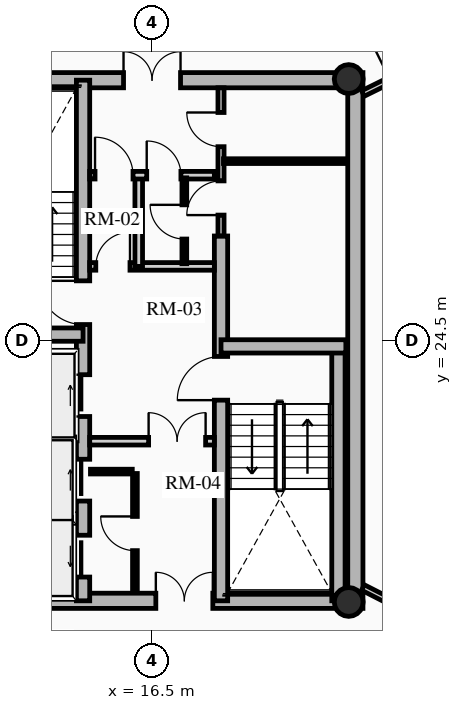
"""IFC4 building model, lengths in metres.
Left out: names, types, materials, properties, quantities, classifications, styles, units other than length and angle.
Written with IfcOpenShell. Run it as: python <this file> out.ifc"""

import sys

from ifc_helpers import new_model, si_unit, direction, frame, frame_2d, origin, origin_2d, place, context, subcontext, project, spatial, rectangle, hollow_circle, extrude, source, transform, mapped, element, fill, save


model = new_model("IFC4")
c1 = context("Model", 3, precision=1e-05, world=origin(), true_north=direction((0.0, 1.0)))
c2 = subcontext(c1, "Body", "Model", "MODEL_VIEW")
j1 = project(units=[si_unit("LENGTHUNIT", "METRE"), si_unit("PLANEANGLEUNIT", "RADIAN")], contexts=[c1])
p1 = place(None, origin())
s1 = spatial("IfcSite", under=j1, at=p1, CompositionType="ELEMENT")
p2 = place(p1, origin())
s2 = spatial("IfcBuilding", under=s1, at=p2, CompositionType="ELEMENT")
p3 = place(p2, frame((0.0, 0.0, 163.24)))
s3 = spatial("IfcBuildingStorey", under=s2, at=p3, CompositionType="ELEMENT", Elevation=163.24)
p4 = place(p3, frame((21.85, 17.45, 0.0), z_axis=(0.0, 0.0, 1.0), x_axis=(0.0, 1.0, 0.0)))
e1 = element("IfcWall", 1, at=p4, inside=s3, PredefinedType="SHEAR", context=c2, shape_type="SweptSolid", body=[
    extrude(rectangle(XDim=14.1, YDim=0.4, at=frame_2d((7.05, 0.0))), origin(), (0.0, 0.0, 1.0), 2.91),
])
p5 = place(p3, frame((11.15, 17.65, 0.0), z_axis=(0.0, 0.0, 1.0), x_axis=(1.0, 0.0, 0.0)))
e2 = element("IfcWall", 2, at=p5, inside=s3, PredefinedType="SHEAR", context=c2, shape_type="SweptSolid", body=[
    extrude(rectangle(XDim=10.7, YDim=0.4, at=frame_2d((5.35, 0.0))), origin(), (0.0, 0.0, 1.0), 2.91),
])
m1 = source(origin(), c2, "Body", "SweptSolid", [
    extrude(rectangle(XDim=1.5, YDim=2.02, at=frame_2d((0.75, 1.01))), frame((0.0, 0.21, 0.0), z_axis=(0.0, -1.0, 0.0), x_axis=(1.0, 0.0, 0.0)), (0.0, 0.0, 1.0), 0.42),
])
p6 = place(p5, frame((5.45, 0.0, 0.0)))
e3 = element("IfcOpeningElement", 3, at=p6, cuts=e2, PredefinedType="OPENING", context=c2, shape_type="MappedRepresentation", body=[
    mapped(m1, transform((0.0, 0.0, 0.0), x_axis=(1.0, 0.0, 0.0), y_axis=(0.0, 1.0, 0.0), z_axis=(0.0, 0.0, 1.0), scale=1.0)),
])
p7 = place(p3, frame((11.15, 31.35, 0.0), z_axis=(0.0, 0.0, 1.0), x_axis=(1.0, 0.0, 0.0)))
e4 = element("IfcWall", 4, at=p7, inside=s3, PredefinedType="SHEAR", context=c2, shape_type="SweptSolid", body=[
    extrude(rectangle(XDim=10.7, YDim=0.4, at=frame_2d((5.35, 0.0))), origin(), (0.0, 0.0, 1.0), 2.91),
])
p8 = place(p7, frame((4.6, 0.0, 0.0)))
e5 = element("IfcOpeningElement", 5, at=p8, cuts=e4, PredefinedType="OPENING", context=c2, shape_type="MappedRepresentation", body=[
    mapped(m1, transform((0.0, 0.0, 0.0), x_axis=(1.0, 0.0, 0.0), y_axis=(0.0, 1.0, 0.0), z_axis=(0.0, 0.0, 1.0), scale=1.0)),
])
p9 = place(p3, frame((14.685, 17.65, 0.0), z_axis=(0.0, 0.0, 1.0), x_axis=(0.0, 1.0, 0.0)))
e6 = element("IfcWall", 6, at=p9, inside=s3, PredefinedType="SHEAR", context=c2, shape_type="SweptSolid", body=[
    extrude(rectangle(XDim=13.7, YDim=0.35, at=frame_2d((6.85, 0.0))), origin(), (0.0, 0.0, 1.0), 2.91),
])
m2 = source(origin(), c2, "Body", "SweptSolid", [
    extrude(rectangle(XDim=1.1, YDim=2.015, at=frame_2d((0.55, 1.007))), frame((0.0, 0.185, 0.0), z_axis=(0.0, -1.0, 0.0), x_axis=(1.0, 0.0, 0.0)), (0.0, 0.0, 1.0), 0.37),
])
p10 = place(p9, frame((4.85, 0.0, 0.0)))
e7 = element("IfcOpeningElement", 7, at=p10, cuts=e6, PredefinedType="OPENING", context=c2, shape_type="MappedRepresentation", body=[
    mapped(m2, transform((0.0, 0.0, 0.0), x_axis=(1.0, 0.0, 0.0), y_axis=(0.0, 1.0, 0.0), z_axis=(0.0, 0.0, 1.0), scale=1.0)),
])
p11 = place(p9, frame((0.625, 0.0, 0.0)))
e8 = element("IfcOpeningElement", 8, at=p11, cuts=e6, PredefinedType="OPENING", context=c2, shape_type="MappedRepresentation", body=[
    mapped(m2, transform((0.0, 0.0, 0.0), x_axis=(1.0, 0.0, 0.0), y_axis=(0.0, 1.0, 0.0), z_axis=(0.0, 0.0, 1.0), scale=1.0)),
])
p12 = place(p9, frame((2.625, 0.0, 0.0)))
e9 = element("IfcOpeningElement", 9, at=p12, cuts=e6, PredefinedType="OPENING", context=c2, shape_type="MappedRepresentation", body=[
    mapped(m2, transform((0.0, 0.0, 0.0), x_axis=(1.0, 0.0, 0.0), y_axis=(0.0, 1.0, 0.0), z_axis=(0.0, 0.0, 1.0), scale=1.0)),
])
m3 = source(origin(), c2, "Body", "SweptSolid", [
    extrude(rectangle(XDim=1.15, YDim=2.02, at=frame_2d((0.575, 1.01))), frame((0.0, 0.185, 0.0), z_axis=(0.0, -1.0, 0.0), x_axis=(1.0, 0.0, 0.0)), (0.0, 0.0, 1.0), 0.37),
])
p13 = place(p9, frame((7.27, 0.0, 0.0)))
e10 = element("IfcOpeningElement", 10, at=p13, cuts=e6, PredefinedType="OPENING", context=c2, shape_type="MappedRepresentation", body=[
    mapped(m3, transform((0.0, 0.0, 0.0), x_axis=(1.0, 0.0, 0.0), y_axis=(0.0, 1.0, 0.0), z_axis=(0.0, 0.0, 1.0), scale=1.0)),
])
p14 = place(p3, frame((18.315, 17.65, 0.0), z_axis=(0.0, 0.0, 1.0), x_axis=(0.0, 1.0, 0.0)))
e11 = element("IfcWall", 11, at=p14, inside=s3, PredefinedType="SHEAR", context=c2, shape_type="SweptSolid", body=[
    extrude(rectangle(XDim=9.6, YDim=0.35, at=frame_2d((4.8, 0.0))), origin(), (0.0, 0.0, 1.0), 2.91),
])
p15 = place(p14, frame((5.28, 0.0, 0.0)))
e12 = element("IfcOpeningElement", 12, at=p15, cuts=e11, PredefinedType="OPENING", context=c2, shape_type="MappedRepresentation", body=[
    mapped(m3, transform((0.0, 0.0, 0.0), x_axis=(1.0, 0.0, 0.0), y_axis=(0.0, 1.0, 0.0), z_axis=(0.0, 0.0, 1.0), scale=1.0)),
])
p16 = place(p3, frame((11.4, 24.655, 0.0), z_axis=(0.0, 0.0, 1.0), x_axis=(1.0, 0.0, 0.0)))
e13 = element("IfcWall", 13, at=p16, inside=s3, PredefinedType="SHEAR", context=c2, shape_type="SweptSolid", body=[
    extrude(rectangle(XDim=3.285, YDim=0.35, at=frame_2d((1.643, 0.0))), origin(), (0.0, 0.0, 1.0), 2.91),
])
p17 = place(p3, frame((21.405, 17.65, 0.0), z_axis=(0.0, 0.0, 1.0), x_axis=(0.0, 1.0, 0.0)))
e14 = element("IfcWall", 14, at=p17, inside=s3, PredefinedType="SHEAR", context=c2, shape_type="SweptSolid", body=[
    extrude(rectangle(XDim=6.695, YDim=0.35, at=frame_2d((3.348, 0.0))), origin(), (0.0, 0.0, 1.0), 2.91),
])
p18 = place(p3, frame((18.315, 24.345, 0.0), z_axis=(0.0, 0.0, 1.0), x_axis=(1.0, 0.0, 0.0)))
e15 = element("IfcWall", 15, at=p18, inside=s3, PredefinedType="SHEAR", context=c2, shape_type="SweptSolid", body=[
    extrude(rectangle(XDim=3.285, YDim=0.35, at=frame_2d((1.643, 0.0))), origin(), (0.0, 0.0, 1.0), 2.91),
])
for number, where, z_axis, x_axis in (
    (16, (21.675, 17.62, 0.0), (0.0, 0.0, 1.0), (1.0, 0.0, 0.0)),
    (17, (21.675, 31.38, 0.0), (0.0, 0.0, 1.0), (1.0, 0.0, 0.0)),
):
    element("IfcColumn", number, at=place(p3, frame(where, z_axis=z_axis, x_axis=x_axis)), inside=s3, PredefinedType="COLUMN", context=c2, shape_type="SweptSolid", body=[
        extrude(hollow_circle(Radius=0.38, WallThickness=0.032, at=origin_2d()), origin(), (0.0, 0.0, 1.0), 2.91),
    ])
for number, where, z_axis, x_axis in (
    (18, (11.52, 21.8, 0.0), (0.0, 0.0, 1.0), (1.0, 0.0, 0.0)),
    (19, (11.52, 19.825, 0.0), (0.0, 0.0, 1.0), (1.0, 0.0, 0.0)),
):
    element("IfcWall", number, at=place(p3, frame(where, z_axis=z_axis, x_axis=x_axis)), inside=s3, PredefinedType="SHEAR", context=c2, shape_type="SweptSolid", body=[
        extrude(rectangle(XDim=2.97, YDim=0.2, at=frame_2d((1.485, 0.0))), origin(), (0.0, 0.0, 1.0), 2.91),
    ])
p19 = place(p3, frame((14.86, 21.85, 0.0), z_axis=(0.0, 0.0, 1.0), x_axis=(1.0, 0.0, 0.0)))
e20 = element("IfcWall", 20, at=p19, inside=s3, PredefinedType="PARTITIONING", context=c2, shape_type="SweptSolid", body=[
    extrude(rectangle(XDim=3.28, YDim=0.2, at=frame_2d((1.64, 0.0))), origin(), (0.0, 0.0, 1.0), 2.675),
])
m4 = source(origin(), c2, "Body", "SweptSolid", [
    extrude(rectangle(XDim=1.5, YDim=2.02, at=frame_2d((0.75, 1.01))), frame((0.0, 0.11, 0.0), z_axis=(0.0, -1.0, 0.0), x_axis=(1.0, 0.0, 0.0)), (0.0, 0.0, 1.0), 0.22),
])
p20 = place(p19, frame((1.55, 0.0, 0.0)))
e21 = element("IfcOpeningElement", 21, at=p20, cuts=e20, PredefinedType="OPENING", context=c2, shape_type="MappedRepresentation", body=[
    mapped(m4, transform((0.0, 0.0, 0.0), x_axis=(1.0, 0.0, 0.0), y_axis=(0.0, 1.0, 0.0), z_axis=(0.0, 0.0, 1.0), scale=1.0)),
])
p21 = place(p3, frame((14.86, 26.45, 0.0), z_axis=(0.0, 0.0, 1.0), x_axis=(1.0, 0.0, 0.0)))
e22 = element("IfcWall", 22, at=p21, inside=s3, PredefinedType="PARTITIONING", context=c2, shape_type="SweptSolid", body=[
    extrude(rectangle(XDim=3.28, YDim=0.2, at=frame_2d((1.64, 0.0))), origin(), (0.0, 0.0, 1.0), 2.675),
])
m5 = source(origin(), c2, "Body", "SweptSolid", [
    extrude(rectangle(XDim=0.9, YDim=2.005, at=frame_2d((0.45, 1.002))), frame((0.0, 0.11, 0.0), z_axis=(0.0, -1.0, 0.0), x_axis=(1.0, 0.0, 0.0)), (0.0, 0.0, 1.0), 0.22),
])
p22 = place(p21, frame((0.16, 0.0, 0.0)))
e23 = element("IfcOpeningElement", 23, at=p22, cuts=e22, PredefinedType="OPENING", context=c2, shape_type="MappedRepresentation", body=[
    mapped(m5, transform((0.0, 0.0, 0.0), x_axis=(1.0, 0.0, 0.0), y_axis=(0.0, 1.0, 0.0), z_axis=(0.0, 0.0, 1.0), scale=1.0)),
])
p23 = place(p3, frame((16.15, 26.45, 0.0), z_axis=(0.0, 0.0, 1.0), x_axis=(0.0, 1.0, 0.0)))
e24 = element("IfcWall", 24, at=p23, inside=s3, PredefinedType="PARTITIONING", context=c2, shape_type="SweptSolid", body=[
    extrude(rectangle(XDim=2.4, YDim=0.2, at=frame_2d((1.2, 0.0))), origin(), (0.0, 0.0, 1.0), 2.675),
])
p24 = place(p3, frame((14.86, 28.85, 0.0), z_axis=(0.0, 0.0, 1.0), x_axis=(1.0, 0.0, 0.0)))
e25 = element("IfcWall", 25, at=p24, inside=s3, PredefinedType="PARTITIONING", context=c2, shape_type="SweptSolid", body=[
    extrude(rectangle(XDim=3.28, YDim=0.2, at=frame_2d((1.64, 0.0))), origin(), (0.0, 0.0, 1.0), 2.675),
])
m6 = source(origin(), c2, "Body", "SweptSolid", [
    extrude(rectangle(XDim=1.0, YDim=2.015, at=frame_2d((0.5, 1.007))), frame((0.0, 0.11, 0.0), z_axis=(0.0, -1.0, 0.0), x_axis=(1.0, 0.0, 0.0)), (0.0, 0.0, 1.0), 0.22),
])
p25 = place(p24, frame((0.14, 0.0, 0.0)))
e26 = element("IfcOpeningElement", 26, at=p25, cuts=e25, PredefinedType="OPENING", context=c2, shape_type="MappedRepresentation", body=[
    mapped(m6, transform((0.0, 0.0, 0.0), x_axis=(1.0, 0.0, 0.0), y_axis=(0.0, 1.0, 0.0), z_axis=(0.0, 0.0, 1.0), scale=1.0)),
])
p26 = place(p24, frame((1.5, 0.0, 0.0)))
e27 = element("IfcOpeningElement", 27, at=p26, cuts=e25, PredefinedType="OPENING", context=c2, shape_type="MappedRepresentation", body=[
    mapped(m5, transform((0.0, 0.0, 0.0), x_axis=(1.0, 0.0, 0.0), y_axis=(0.0, 1.0, 0.0), z_axis=(0.0, 0.0, 1.0), scale=1.0)),
])
p27 = place(p3, frame((16.05, 17.92, 0.0), z_axis=(0.0, 0.0, 1.0), x_axis=(0.0, 1.0, 0.0)))
e28 = element("IfcWall", 28, at=p27, inside=s3, PredefinedType="PARTITIONING", context=c2, shape_type="SweptSolid", body=[
    extrude(rectangle(XDim=3.08, YDim=0.125, at=frame_2d((1.54, 0.0))), origin(), (0.0, 0.0, 1.0), 2.675),
])
m7 = source(origin(), c2, "Body", "SweptSolid", [
    extrude(rectangle(XDim=0.9, YDim=2.005, at=frame_2d((0.45, 1.002))), frame((0.0, 0.073, 0.0), z_axis=(0.0, -1.0, 0.0), x_axis=(1.0, 0.0, 0.0)), (0.0, 0.0, 1.0), 0.145),
])
p28 = place(p27, frame((1.05, 0.0, 0.0)))
e29 = element("IfcOpeningElement", 29, at=p28, cuts=e28, PredefinedType="OPENING", context=c2, shape_type="MappedRepresentation", body=[
    mapped(m7, transform((0.0, 0.0, 0.0), x_axis=(1.0, 0.0, 0.0), y_axis=(0.0, 1.0, 0.0), z_axis=(0.0, 0.0, 1.0), scale=1.0)),
])
p29 = place(p3, frame((14.88, 21.05, 0.0), z_axis=(0.0, 0.0, 1.0), x_axis=(1.0, 0.0, 0.0)))
e30 = element("IfcWall", 30, at=p29, inside=s3, PredefinedType="PARTITIONING", context=c2, shape_type="SweptSolid", body=[
    extrude(rectangle(XDim=1.1, YDim=0.125, at=frame_2d((0.55, 0.0))), origin(), (0.0, 0.0, 1.0), 2.675),
])
p30 = place(p3, frame((17.35, 26.52, 0.0), z_axis=(0.0, 0.0, 1.0), x_axis=(0.0, 1.0, 0.0)))
e31 = element("IfcWall", 31, at=p30, inside=s3, PredefinedType="PARTITIONING", context=c2, shape_type="SweptSolid", body=[
    extrude(rectangle(XDim=2.26, YDim=0.125, at=frame_2d((1.13, 0.0))), origin(), (0.0, 0.0, 1.0), 2.675),
])
p31 = place(p30, frame((0.65, 0.0, 0.0)))
e32 = element("IfcOpeningElement", 32, at=p31, cuts=e31, PredefinedType="OPENING", context=c2, shape_type="MappedRepresentation", body=[
    mapped(m7, transform((0.0, 0.0, 0.0), x_axis=(1.0, 0.0, 0.0), y_axis=(0.0, 1.0, 0.0), z_axis=(0.0, 0.0, 1.0), scale=1.0)),
])
p32 = place(p3, frame((18.315, 27.25, 0.0), z_axis=(0.0, 0.0, 1.0), x_axis=(0.0, 1.0, 0.0)))
e33 = element("IfcWall", 33, at=p32, inside=s3, PredefinedType="PARTITIONING", context=c2, shape_type="SweptSolid", body=[
    extrude(rectangle(XDim=3.9, YDim=0.16, at=frame_2d((1.95, 0.0))), origin(), (0.0, 0.0, 1.0), 2.675),
])
m8 = source(origin(), c2, "Body", "SweptSolid", [
    extrude(rectangle(XDim=0.9, YDim=2.005, at=frame_2d((0.45, 1.002))), frame((0.0, 0.09, 0.0), z_axis=(0.0, -1.0, 0.0), x_axis=(1.0, 0.0, 0.0)), (0.0, 0.0, 1.0), 0.18),
])
p33 = place(p32, frame((0.55, 0.0, 0.0)))
e34 = element("IfcOpeningElement", 34, at=p33, cuts=e33, PredefinedType="OPENING", context=c2, shape_type="MappedRepresentation", body=[
    mapped(m8, transform((0.0, 0.0, 0.0), x_axis=(1.0, 0.0, 0.0), y_axis=(0.0, 1.0, 0.0), z_axis=(0.0, 0.0, 1.0), scale=1.0)),
])
p34 = place(p32, frame((2.35, 0.0, 0.0)))
e35 = element("IfcOpeningElement", 35, at=p34, cuts=e33, PredefinedType="OPENING", context=c2, shape_type="MappedRepresentation", body=[
    mapped(m8, transform((0.0, 0.0, 0.0), x_axis=(1.0, 0.0, 0.0), y_axis=(0.0, 1.0, 0.0), z_axis=(0.0, 0.0, 1.0), scale=1.0)),
])
p35 = place(p3, frame((18.38, 29.22, 0.0), z_axis=(0.0, 0.0, 1.0), x_axis=(1.0, 0.0, 0.0)))
e36 = element("IfcWall", 36, at=p35, inside=s3, PredefinedType="PARTITIONING", context=c2, shape_type="SweptSolid", body=[
    extrude(rectangle(XDim=3.22, YDim=0.125, at=frame_2d((1.61, 0.0))), origin(), (0.0, 0.0, 1.0), 2.212),
])
p36 = place(p3, frame((22.05, 31.0, 0.0), z_axis=(0.0, 0.0, 1.0), x_axis=(0.896798317999, 0.442439574218, 0.0)))
e37 = element("IfcWall", 37, at=p36, inside=s3, PredefinedType="PARTITIONING", context=c2, shape_type="SweptSolid", body=[
    extrude(rectangle(XDim=2.048, YDim=0.16, at=frame_2d((1.024, 0.0))), origin(), (0.0, 0.0, 1.0), 2.245),
])
m9 = source(origin(), c2, "Body", "SweptSolid", [
    extrude(rectangle(XDim=1.05, YDim=2.015, at=frame_2d((0.525, 1.007))), frame((0.0, 0.09, 0.0), z_axis=(0.0, -1.0, 0.0), x_axis=(1.0, 0.0, 0.0)), (0.0, 0.0, 1.0), 0.18),
])
p37 = place(p36, frame((0.798, 0.0, 0.0)))
e38 = element("IfcOpeningElement", 38, at=p37, cuts=e37, PredefinedType="OPENING", context=c2, shape_type="MappedRepresentation", body=[
    mapped(m9, transform((0.0, 0.0, 0.0), x_axis=(1.0, 0.0, 0.0), y_axis=(0.0, 1.0, 0.0), z_axis=(0.0, 0.0, 1.0), scale=1.0)),
])
p38 = place(p3, frame((22.05, 18.0, 0.0), z_axis=(0.0, 0.0, 1.0), x_axis=(0.890660222535, -0.454669515136, 0.0)))
e39 = element("IfcWall", 39, at=p38, inside=s3, PredefinedType="PARTITIONING", context=c2, shape_type="SweptSolid", body=[
    extrude(rectangle(XDim=2.144, YDim=0.16, at=frame_2d((1.072, 0.0))), origin(), (0.0, 0.0, 1.0), 2.245),
])
p39 = place(p38, frame((0.894, 0.0, 0.0)))
e40 = element("IfcOpeningElement", 40, at=p39, cuts=e39, PredefinedType="OPENING", context=c2, shape_type="MappedRepresentation", body=[
    mapped(m9, transform((0.0, 0.0, 0.0), x_axis=(1.0, 0.0, 0.0), y_axis=(0.0, 1.0, 0.0), z_axis=(0.0, 0.0, 1.0), scale=1.0)),
])
m10 = source(origin(), c2, "Body", "SweptSolid", [
    extrude(rectangle(XDim=1.1, YDim=2.015, at=frame_2d((0.55, 1.007))), frame((0.0, 0.025, 0.0), z_axis=(0.0, -1.0, 0.0), x_axis=(1.0, 0.0, 0.0)), (0.0, 0.0, 1.0), 0.05),
])
p40 = place(p10, origin())
e41 = element("IfcDoor", 41, at=p40, inside=s3, OperationType="SLIDING_TO_RIGHT", PredefinedType="DOOR", context=c2, shape_type="MappedRepresentation", body=[
    mapped(m10, transform((0.0, 0.0, 0.0), x_axis=(1.0, 0.0, 0.0), y_axis=(0.0, 1.0, 0.0), z_axis=(0.0, 0.0, 1.0), scale=1.0)),
])
fill(e7, e41)
p41 = place(p11, origin())
e42 = element("IfcDoor", 42, at=p41, inside=s3, OperationType="SLIDING_TO_LEFT", PredefinedType="DOOR", context=c2, shape_type="MappedRepresentation", body=[
    mapped(m10, transform((0.0, 0.0, 0.0), x_axis=(1.0, 0.0, 0.0), y_axis=(0.0, 1.0, 0.0), z_axis=(0.0, 0.0, 1.0), scale=1.0)),
])
fill(e8, e42)
p42 = place(p12, origin())
e43 = element("IfcDoor", 43, at=p42, inside=s3, OperationType="SLIDING_TO_RIGHT", PredefinedType="DOOR", context=c2, shape_type="MappedRepresentation", body=[
    mapped(m10, transform((0.0, 0.0, 0.0), x_axis=(1.0, 0.0, 0.0), y_axis=(0.0, 1.0, 0.0), z_axis=(0.0, 0.0, 1.0), scale=1.0)),
])
fill(e9, e43)
m11 = source(origin(), c2, "Body", "SweptSolid", [
    extrude(rectangle(XDim=1.15, YDim=2.02, at=frame_2d((0.575, 1.01))), frame((0.0, 0.025, 0.0), z_axis=(0.0, -1.0, 0.0), x_axis=(1.0, 0.0, 0.0)), (0.0, 0.0, 1.0), 0.05),
])
p43 = place(p13, origin())
e44 = element("IfcDoor", 44, at=p43, inside=s3, OperationType="SINGLE_SWING_RIGHT", PredefinedType="DOOR", context=c2, shape_type="MappedRepresentation", body=[
    mapped(m11, transform((0.0, 0.0, 0.0), x_axis=(1.0, 0.0, 0.0), y_axis=(0.0, 1.0, 0.0), z_axis=(0.0, 0.0, 1.0), scale=1.0)),
])
fill(e10, e44)
p44 = place(p15, origin())
e45 = element("IfcDoor", 45, at=p44, inside=s3, OperationType="SINGLE_SWING_LEFT", PredefinedType="DOOR", context=c2, shape_type="MappedRepresentation", body=[
    mapped(m11, transform((0.0, 0.0, 0.0), x_axis=(1.0, 0.0, 0.0), y_axis=(0.0, 1.0, 0.0), z_axis=(0.0, 0.0, 1.0), scale=1.0)),
])
fill(e12, e45)
m12 = source(origin(), c2, "Body", "SweptSolid", [
    extrude(rectangle(XDim=1.5, YDim=2.02, at=frame_2d((0.75, 1.01))), frame((0.0, 0.025, 0.0), z_axis=(0.0, -1.0, 0.0), x_axis=(1.0, 0.0, 0.0)), (0.0, 0.0, 1.0), 0.05),
])
p45 = place(p8, origin())
e46 = element("IfcDoor", 46, at=p45, inside=s3, OperationType="DOUBLE_DOOR_SINGLE_SWING", PredefinedType="DOOR", context=c2, shape_type="MappedRepresentation", body=[
    mapped(m12, transform((0.0, 0.0, 0.0), x_axis=(1.0, 0.0, 0.0), y_axis=(0.0, 1.0, 0.0), z_axis=(0.0, 0.0, 1.0), scale=1.0)),
])
fill(e5, e46)
p46 = place(p6, origin())
e47 = element("IfcDoor", 47, at=p46, inside=s3, OperationType="DOUBLE_DOOR_SINGLE_SWING", PredefinedType="DOOR", context=c2, shape_type="MappedRepresentation", body=[
    mapped(m12, transform((0.0, 0.0, 0.0), x_axis=(1.0, 0.0, 0.0), y_axis=(0.0, 1.0, 0.0), z_axis=(0.0, 0.0, 1.0), scale=1.0)),
])
fill(e3, e47)
p47 = place(p20, origin())
e48 = element("IfcDoor", 48, at=p47, inside=s3, OperationType="DOUBLE_DOOR_SINGLE_SWING", PredefinedType="DOOR", context=c2, shape_type="MappedRepresentation", body=[
    mapped(m12, transform((0.0, 0.0, 0.0), x_axis=(1.0, 0.0, 0.0), y_axis=(0.0, 1.0, 0.0), z_axis=(0.0, 0.0, 1.0), scale=1.0)),
])
fill(e21, e48)
m13 = source(origin(), c2, "Body", "SweptSolid", [
    extrude(rectangle(XDim=0.9, YDim=2.005, at=frame_2d((0.45, 1.002))), frame((0.0, 0.025, 0.0), z_axis=(0.0, -1.0, 0.0), x_axis=(1.0, 0.0, 0.0)), (0.0, 0.0, 1.0), 0.05),
])
p48 = place(p22, origin())
e49 = element("IfcDoor", 49, at=p48, inside=s3, OperationType="SINGLE_SWING_RIGHT", PredefinedType="DOOR", context=c2, shape_type="MappedRepresentation", body=[
    mapped(m13, transform((0.0, 0.0, 0.0), x_axis=(1.0, 0.0, 0.0), y_axis=(0.0, 1.0, 0.0), z_axis=(0.0, 0.0, 1.0), scale=1.0)),
])
fill(e23, e49)
m14 = source(origin(), c2, "Body", "SweptSolid", [
    extrude(rectangle(XDim=1.0, YDim=2.015, at=frame_2d((0.5, 1.007))), frame((0.0, 0.025, 0.0), z_axis=(0.0, -1.0, 0.0), x_axis=(1.0, 0.0, 0.0)), (0.0, 0.0, 1.0), 0.05),
])
p49 = place(p25, origin())
e50 = element("IfcDoor", 50, at=p49, inside=s3, OperationType="SINGLE_SWING_LEFT", PredefinedType="DOOR", context=c2, shape_type="MappedRepresentation", body=[
    mapped(m14, transform((0.0, 0.0, 0.0), x_axis=(1.0, 0.0, 0.0), y_axis=(0.0, 1.0, 0.0), z_axis=(0.0, 0.0, 1.0), scale=1.0)),
])
fill(e26, e50)
p50 = place(p28, origin())
e51 = element("IfcDoor", 51, at=p50, inside=s3, OperationType="SINGLE_SWING_RIGHT", PredefinedType="DOOR", context=c2, shape_type="MappedRepresentation", body=[
    mapped(m13, transform((0.0, 0.0, 0.0), x_axis=(1.0, 0.0, 0.0), y_axis=(0.0, 1.0, 0.0), z_axis=(0.0, 0.0, 1.0), scale=1.0)),
])
fill(e29, e51)
p51 = place(p26, origin())
e52 = element("IfcDoor", 52, at=p51, inside=s3, OperationType="SINGLE_SWING_LEFT", PredefinedType="DOOR", context=c2, shape_type="MappedRepresentation", body=[
    mapped(m13, transform((0.0, 0.0, 0.0), x_axis=(1.0, 0.0, 0.0), y_axis=(0.0, 1.0, 0.0), z_axis=(0.0, 0.0, 1.0), scale=1.0)),
])
fill(e27, e52)
p52 = place(p31, origin())
e53 = element("IfcDoor", 53, at=p52, inside=s3, OperationType="SINGLE_SWING_RIGHT", PredefinedType="DOOR", context=c2, shape_type="MappedRepresentation", body=[
    mapped(m13, transform((0.0, 0.0, 0.0), x_axis=(1.0, 0.0, 0.0), y_axis=(0.0, 1.0, 0.0), z_axis=(0.0, 0.0, 1.0), scale=1.0)),
])
fill(e32, e53)
p53 = place(p33, origin())
e54 = element("IfcDoor", 54, at=p53, inside=s3, OperationType="SINGLE_SWING_LEFT", PredefinedType="DOOR", context=c2, shape_type="MappedRepresentation", body=[
    mapped(m13, transform((0.0, 0.0, 0.0), x_axis=(1.0, 0.0, 0.0), y_axis=(0.0, 1.0, 0.0), z_axis=(0.0, 0.0, 1.0), scale=1.0)),
])
fill(e34, e54)
p54 = place(p34, origin())
e55 = element("IfcDoor", 55, at=p54, inside=s3, OperationType="SINGLE_SWING_RIGHT", PredefinedType="DOOR", context=c2, shape_type="MappedRepresentation", body=[
    mapped(m13, transform((0.0, 0.0, 0.0), x_axis=(1.0, 0.0, 0.0), y_axis=(0.0, 1.0, 0.0), z_axis=(0.0, 0.0, 1.0), scale=1.0)),
])
fill(e35, e55)
save(model, sys.argv[1])
